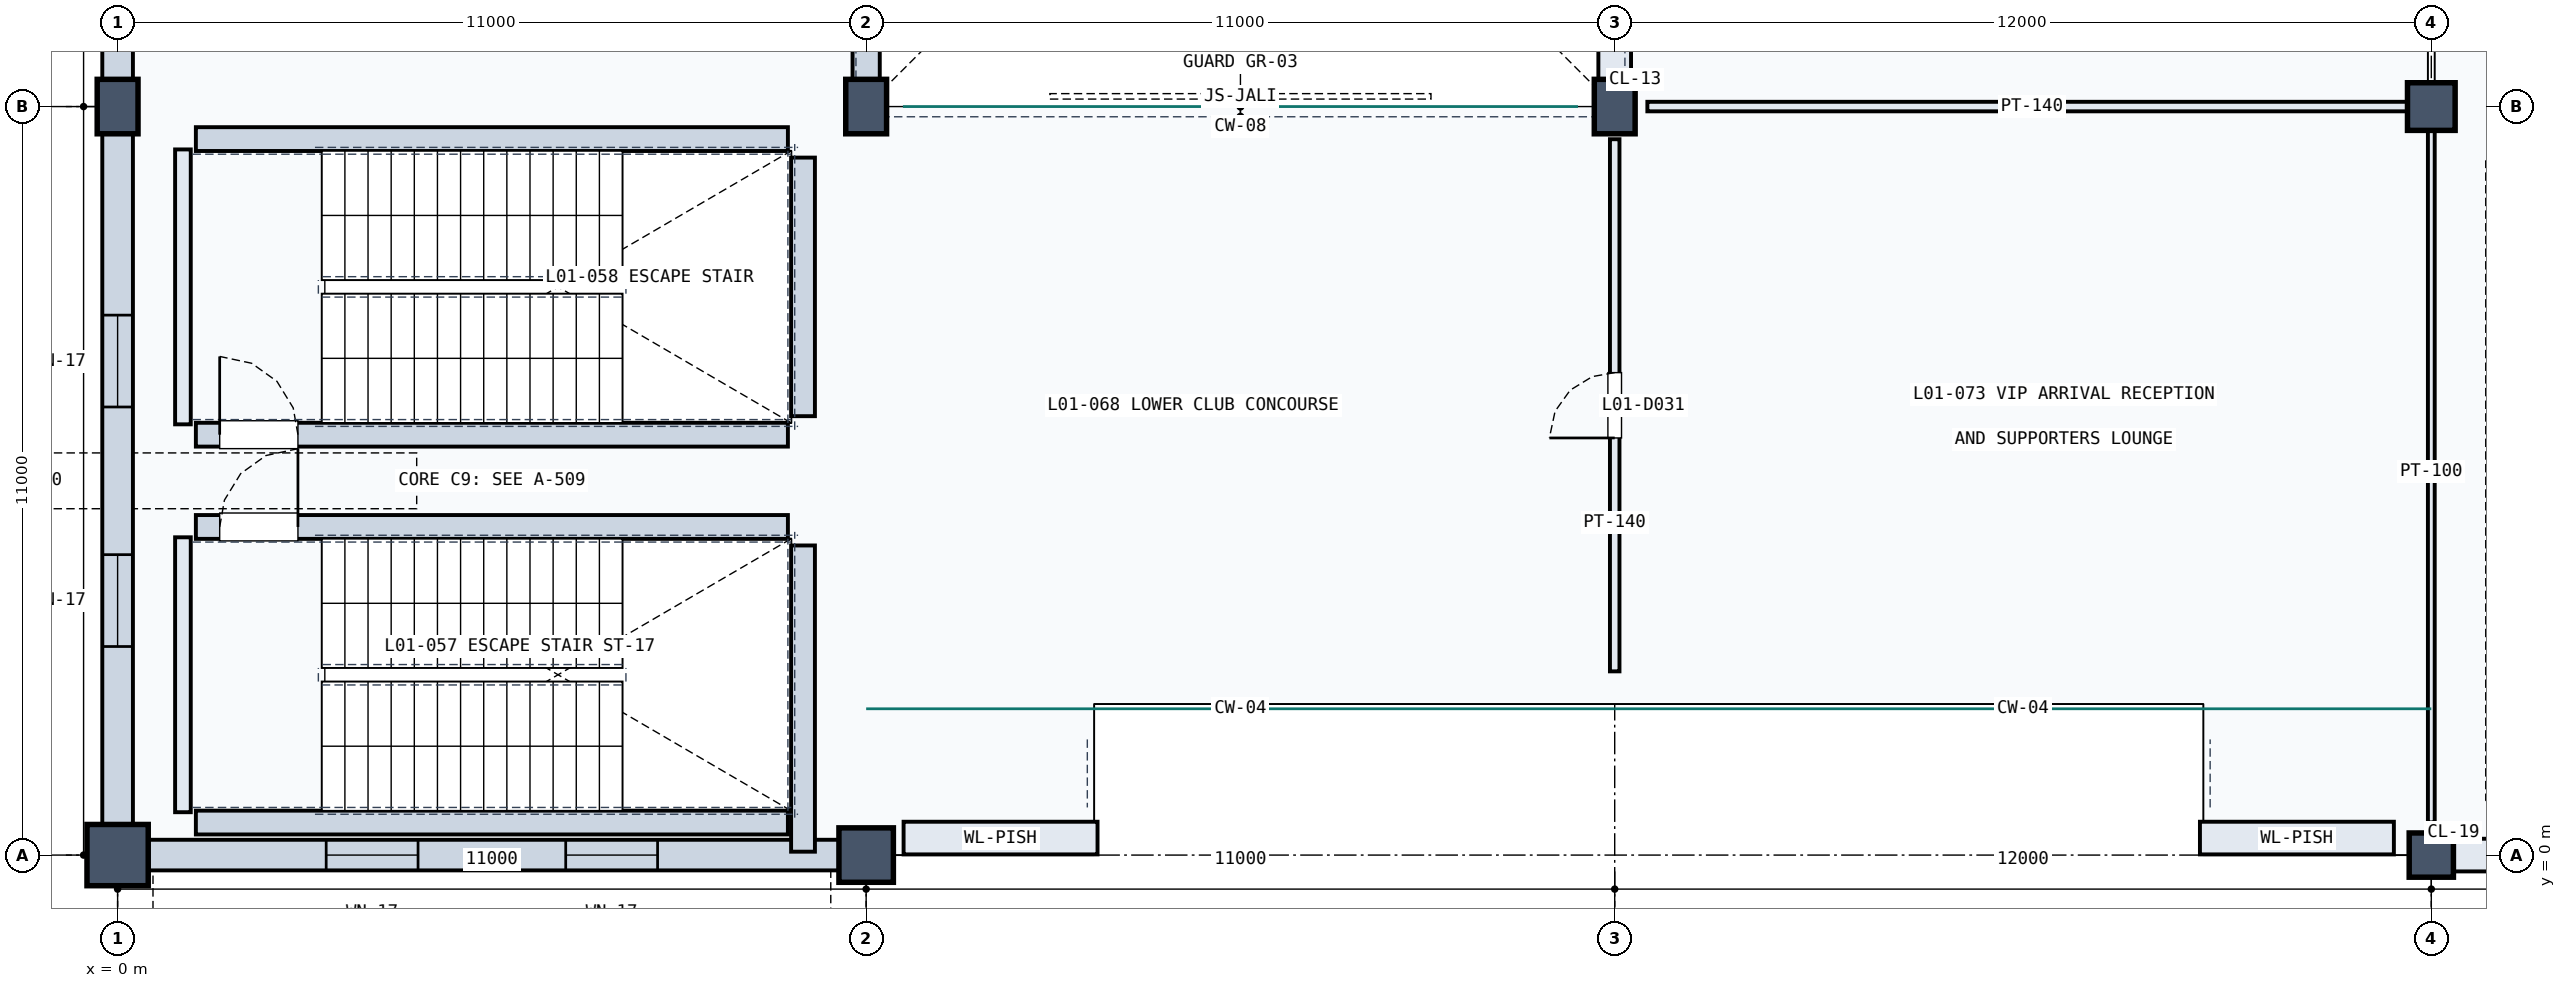
"""IFC4 building model, lengths in metres.
Left out: names, types, materials, properties, quantities, classifications, styles, units other than length and angle.
Written with IfcOpenShell. Run it as: python <this file> out.ifc"""

import sys

from ifc_helpers import new_model, si_unit, direction, frame, frame_2d, origin, origin_with_axes, origin_2d, place, context, subcontext, project, spatial, rectangle, circle, extrude, element, fill, save


model = new_model("IFC4")
c1 = context("Model", 3, precision=1e-05, world=origin(), true_north=direction((0.0, 1.0)))
c2 = subcontext(c1, "Body", "Model", "MODEL_VIEW")
j1 = project(units=[si_unit("LENGTHUNIT", "METRE"), si_unit("PLANEANGLEUNIT", "RADIAN")], contexts=[c1])
p1 = place(None, origin())
s1 = spatial("IfcSite", under=j1, at=p1, CompositionType="ELEMENT")
p2 = place(p1, origin())
s2 = spatial("IfcBuilding", under=s1, at=p2, CompositionType="ELEMENT")
p3 = place(p2, frame((0.0, 0.0, 5.4)))
s3 = spatial("IfcBuildingStorey", under=s2, at=p3, CompositionType="ELEMENT", Elevation=5.4)
p4 = place(p3, origin_with_axes())
e1 = element("IfcColumn", 1, at=p4, inside=s3, PredefinedType="COLUMN", context=c2, shape_type="SweptSolid", body=[
    extrude(circle(Radius=0.45, at=origin_2d()), origin(), (0.0, 0.0, 1.0), 4.8),
])
p5 = place(p3, frame((0.0, 11.0, 0.0), z_axis=(0.0, 0.0, 1.0), x_axis=(1.0, 0.0, 0.0)))
e2 = element("IfcColumn", 2, at=p5, inside=s3, PredefinedType="COLUMN", context=c2, shape_type="SweptSolid", body=[
    extrude(rectangle(XDim=0.6, YDim=0.8, at=origin_2d()), origin(), (0.0, 0.0, 1.0), 4.8),
])
p6 = place(p3, frame((11.0, 0.0, 0.0), z_axis=(0.0, 0.0, 1.0), x_axis=(1.0, 0.0, 0.0)))
e3 = element("IfcColumn", 3, at=p6, inside=s3, PredefinedType="COLUMN", context=c2, shape_type="SweptSolid", body=[
    extrude(circle(Radius=0.4, at=origin_2d()), origin(), (0.0, 0.0, 1.0), 4.8),
])
for number, where, z_axis, x_axis in (
    (4, (11.0, 11.0, 0.0), (0.0, 0.0, 1.0), (1.0, 0.0, 0.0)),
    (5, (22.0, 11.0, 0.0), (0.0, 0.0, 1.0), (1.0, 0.0, 0.0)),
):
    element("IfcColumn", number, at=place(p3, frame(where, z_axis=z_axis, x_axis=x_axis)), inside=s3, PredefinedType="COLUMN", context=c2, shape_type="SweptSolid", body=[
        extrude(rectangle(XDim=0.6, YDim=0.8, at=origin_2d()), origin(), (0.0, 0.0, 1.0), 4.8),
    ])
p7 = place(p3, frame((34.0, 0.0, 0.0), z_axis=(0.0, 0.0, 1.0), x_axis=(1.0, 0.0, 0.0)))
e6 = element("IfcColumn", 6, at=p7, inside=s3, PredefinedType="COLUMN", context=c2, shape_type="SweptSolid", body=[
    extrude(circle(Radius=0.325, at=origin_2d()), origin(), (0.0, 0.0, 1.0), 4.8),
])
p8 = place(p3, frame((34.0, 11.0, 0.0), z_axis=(0.0, 0.0, 1.0), x_axis=(1.0, 0.0, 0.0)))
e7 = element("IfcColumn", 7, at=p8, inside=s3, PredefinedType="COLUMN", context=c2, shape_type="SweptSolid", body=[
    extrude(rectangle(XDim=0.7, YDim=0.7, at=origin_2d()), origin(), (0.0, 0.0, 1.0), 4.8),
])
for number, where, z_axis, x_axis in (
    (8, (11.55, 0.25, 0.0), (0.0, 0.0, 1.0), (1.0, 0.0, 0.0)),
    (9, (30.6, 0.25, 0.0), (0.0, 0.0, 1.0), (1.0, 0.0, 0.0)),
):
    element("IfcWall", number, at=place(p3, frame(where, z_axis=z_axis, x_axis=x_axis)), inside=s3, PredefinedType="SOLIDWALL", context=c2, shape_type="SweptSolid", body=[
        extrude(rectangle(XDim=2.85, YDim=0.48, at=frame_2d((1.425, 0.0))), origin(), (0.0, 0.0, 1.0), 4.44),
    ])
p9 = place(p3, frame((0.22, 0.0, 0.0), z_axis=(0.0, 0.0, 1.0), x_axis=(1.0, 0.0, 0.0)))
e10 = element("IfcWall", 10, at=p9, inside=s3, PredefinedType="SOLIDWALL", context=c2, shape_type="SweptSolid", body=[
    extrude(rectangle(XDim=10.56, YDim=0.45, at=frame_2d((5.28, 0.0))), origin(), (0.0, 0.0, 1.0), 3.79),
])
p10 = place(p9, frame((2.845, 0.0, 0.8)))
e11 = element("IfcOpeningElement", 11, at=p10, cuts=e10, PredefinedType="OPENING", context=c2, shape_type="SweptSolid", body=[
    extrude(rectangle(XDim=1.35, YDim=2.1, at=frame_2d((0.675, 1.05))), frame((0.0, 0.235, 0.0), z_axis=(0.0, -1.0, 0.0), x_axis=(1.0, 0.0, 0.0)), (0.0, 0.0, 1.0), 0.47),
])
p11 = place(p9, frame((6.365, 0.0, 0.8)))
e12 = element("IfcOpeningElement", 12, at=p11, cuts=e10, PredefinedType="OPENING", context=c2, shape_type="SweptSolid", body=[
    extrude(rectangle(XDim=1.35, YDim=2.1, at=frame_2d((0.675, 1.05))), frame((0.0, 0.235, 0.0), z_axis=(0.0, -1.0, 0.0), x_axis=(1.0, 0.0, 0.0)), (0.0, 0.0, 1.0), 0.47),
])
p12 = place(p3, frame((0.0, 0.22, 0.0), z_axis=(0.0, 0.0, 1.0), x_axis=(0.0, 1.0, 0.0)))
e13 = element("IfcWall", 13, at=p12, inside=s3, PredefinedType="SOLIDWALL", context=c2, shape_type="SweptSolid", body=[
    extrude(rectangle(XDim=10.56, YDim=0.45, at=frame_2d((5.28, 0.0))), origin(), (0.0, 0.0, 1.0), 3.69),
])
p13 = place(p12, frame((2.845, 0.0, 0.8)))
e14 = element("IfcOpeningElement", 14, at=p13, cuts=e13, PredefinedType="OPENING", context=c2, shape_type="SweptSolid", body=[
    extrude(rectangle(XDim=1.35, YDim=2.1, at=frame_2d((0.675, 1.05))), frame((0.0, 0.235, 0.0), z_axis=(0.0, -1.0, 0.0), x_axis=(1.0, 0.0, 0.0)), (0.0, 0.0, 1.0), 0.47),
])
p14 = place(p12, frame((6.365, 0.0, 0.8)))
e15 = element("IfcOpeningElement", 15, at=p14, cuts=e13, PredefinedType="OPENING", context=c2, shape_type="SweptSolid", body=[
    extrude(rectangle(XDim=1.35, YDim=2.1, at=frame_2d((0.675, 1.05))), frame((0.0, 0.235, 0.0), z_axis=(0.0, -1.0, 0.0), x_axis=(1.0, 0.0, 0.0)), (0.0, 0.0, 1.0), 0.47),
])
p15 = place(p3, frame((0.0, 11.22, 0.0), z_axis=(0.0, 0.0, 1.0), x_axis=(0.0, 1.0, 0.0)))
e16 = element("IfcWall", 16, at=p15, inside=s3, PredefinedType="SOLIDWALL", context=c2, shape_type="SweptSolid", body=[
    extrude(rectangle(XDim=10.56, YDim=0.45, at=frame_2d((5.28, 0.0))), origin(), (0.0, 0.0, 1.0), 3.69),
])
p16 = place(p15, frame((2.845, 0.0, 0.8)))
e17 = element("IfcOpeningElement", 17, at=p16, cuts=e16, PredefinedType="OPENING", context=c2, shape_type="SweptSolid", body=[
    extrude(rectangle(XDim=1.35, YDim=2.1, at=frame_2d((0.675, 1.05))), frame((0.0, 0.235, 0.0), z_axis=(0.0, -1.0, 0.0), x_axis=(1.0, 0.0, 0.0)), (0.0, 0.0, 1.0), 0.47),
])
p17 = place(p15, frame((6.365, 0.0, 0.8)))
e18 = element("IfcOpeningElement", 18, at=p17, cuts=e16, PredefinedType="OPENING", context=c2, shape_type="SweptSolid", body=[
    extrude(rectangle(XDim=1.35, YDim=2.1, at=frame_2d((0.675, 1.05))), frame((0.0, 0.235, 0.0), z_axis=(0.0, -1.0, 0.0), x_axis=(1.0, 0.0, 0.0)), (0.0, 0.0, 1.0), 0.47),
])
p18 = place(p3, frame((11.0, 11.22, 0.0), z_axis=(0.0, 0.0, 1.0), x_axis=(0.0, 1.0, 0.0)))
e19 = element("IfcWall", 19, at=p18, inside=s3, PredefinedType="SOLIDWALL", context=c2, shape_type="SweptSolid", body=[
    extrude(rectangle(XDim=10.78, YDim=0.4, at=frame_2d((5.39, 0.0))), origin(), (0.0, 0.0, 1.0), 3.69),
])
p19 = place(p18, frame((2.918, 0.0, 0.8)))
e20 = element("IfcOpeningElement", 20, at=p19, cuts=e19, PredefinedType="OPENING", context=c2, shape_type="SweptSolid", body=[
    extrude(rectangle(XDim=1.35, YDim=2.1, at=frame_2d((0.675, 1.05))), frame((0.0, 0.21, 0.0), z_axis=(0.0, -1.0, 0.0), x_axis=(1.0, 0.0, 0.0)), (0.0, 0.0, 1.0), 0.42),
])
p20 = place(p18, frame((6.512, 0.0, 0.8)))
e21 = element("IfcOpeningElement", 21, at=p20, cuts=e19, PredefinedType="OPENING", context=c2, shape_type="SweptSolid", body=[
    extrude(rectangle(XDim=1.35, YDim=2.1, at=frame_2d((0.675, 1.05))), frame((0.0, 0.21, 0.0), z_axis=(0.0, -1.0, 0.0), x_axis=(1.0, 0.0, 0.0)), (0.0, 0.0, 1.0), 0.42),
])
p21 = place(p3, frame((22.0, 11.22, 0.0), z_axis=(0.0, 0.0, 1.0), x_axis=(0.0, 1.0, 0.0)))
e22 = element("IfcWall", 22, at=p21, inside=s3, PredefinedType="SOLIDWALL", context=c2, shape_type="SweptSolid", body=[
    extrude(rectangle(XDim=10.56, YDim=0.48, at=frame_2d((5.28, 0.0))), origin(), (0.0, 0.0, 1.0), 3.707),
])
p22 = place(p21, frame((3.78, 0.0, 0.9)))
e23 = element("IfcOpeningElement", 23, at=p22, cuts=e22, PredefinedType="OPENING", context=c2, shape_type="SweptSolid", body=[
    extrude(rectangle(XDim=3.0, YDim=1.8, at=frame_2d((1.5, 0.9))), frame((0.0, 0.25, 0.0), z_axis=(0.0, -1.0, 0.0), x_axis=(1.0, 0.0, 0.0)), (0.0, 0.0, 1.0), 0.5),
])
p23 = place(p3, frame((34.22, 0.0, 0.0), z_axis=(0.0, 0.0, 1.0), x_axis=(1.0, 0.0, 0.0)))
e24 = element("IfcWall", 24, at=p23, inside=s3, PredefinedType="SOLIDWALL", context=c2, shape_type="SweptSolid", body=[
    extrude(rectangle(XDim=11.56, YDim=0.48, at=frame_2d((5.78, 0.0))), origin(), (0.0, 0.0, 1.0), 3.59),
])
p24 = place(p23, frame((2.853, 0.0, 0.9)))
e25 = element("IfcOpeningElement", 25, at=p24, cuts=e24, PredefinedType="OPENING", context=c2, shape_type="SweptSolid", body=[
    extrude(rectangle(XDim=2.0, YDim=1.65, at=frame_2d((1.0, 0.825))), frame((0.0, 0.25, 0.0), z_axis=(0.0, -1.0, 0.0), x_axis=(1.0, 0.0, 0.0)), (0.0, 0.0, 1.0), 0.5),
])
p25 = place(p23, frame((6.707, 0.0, 0.9)))
e26 = element("IfcOpeningElement", 26, at=p25, cuts=e24, PredefinedType="OPENING", context=c2, shape_type="SweptSolid", body=[
    extrude(rectangle(XDim=2.0, YDim=1.65, at=frame_2d((1.0, 0.825))), frame((0.0, 0.25, 0.0), z_axis=(0.0, -1.0, 0.0), x_axis=(1.0, 0.0, 0.0)), (0.0, 0.0, 1.0), 0.5),
])
p26 = place(p3, frame((0.96, 0.63, 0.0), z_axis=(0.0, 0.0, 1.0), x_axis=(0.0, 1.0, 0.0)))
e27 = element("IfcWall", 27, at=p26, inside=s3, PredefinedType="SOLIDWALL", context=c2, shape_type="SweptSolid", body=[
    extrude(rectangle(XDim=4.04, YDim=0.23, at=frame_2d((2.02, 0.0))), origin(), (0.0, 0.0, 1.0), 4.46),
])
p27 = place(p3, frame((10.072, 0.05, 0.0), z_axis=(0.0, 0.0, 1.0), x_axis=(0.0, 1.0, 0.0)))
e28 = element("IfcWall", 28, at=p27, inside=s3, PredefinedType="SOLIDWALL", context=c2, shape_type="SweptSolid", body=[
    extrude(rectangle(XDim=4.5, YDim=0.35, at=frame_2d((2.25, 0.0))), origin(), (0.0, 0.0, 1.0), 4.46),
])
p28 = place(p3, frame((1.15, 0.478, 0.0), z_axis=(0.0, 0.0, 1.0), x_axis=(1.0, 0.0, 0.0)))
e29 = element("IfcWall", 29, at=p28, inside=s3, PredefinedType="SOLIDWALL", context=c2, shape_type="SweptSolid", body=[
    extrude(rectangle(XDim=8.7, YDim=0.35, at=frame_2d((4.35, 0.0))), origin(), (0.0, 0.0, 1.0), 4.46),
])
p29 = place(p3, frame((1.15, 4.822, 0.0), z_axis=(0.0, 0.0, 1.0), x_axis=(1.0, 0.0, 0.0)))
e30 = element("IfcWall", 30, at=p29, inside=s3, PredefinedType="SOLIDWALL", context=c2, shape_type="SweptSolid", body=[
    extrude(rectangle(XDim=8.7, YDim=0.35, at=frame_2d((4.35, 0.0))), origin(), (0.0, 0.0, 1.0), 4.46),
])
p30 = place(p29, frame((0.35, 0.0, 0.0)))
e31 = element("IfcOpeningElement", 31, at=p30, cuts=e30, PredefinedType="OPENING", context=c2, shape_type="SweptSolid", body=[
    extrude(rectangle(XDim=1.15, YDim=2.2, at=frame_2d((0.575, 1.1))), frame((0.0, 0.185, 0.0), z_axis=(0.0, -1.0, 0.0), x_axis=(1.0, 0.0, 0.0)), (0.0, 0.0, 1.0), 0.37),
])
p31 = place(p3, frame((0.96, 6.33, 0.0), z_axis=(0.0, 0.0, 1.0), x_axis=(0.0, 1.0, 0.0)))
e32 = element("IfcWall", 32, at=p31, inside=s3, PredefinedType="SOLIDWALL", context=c2, shape_type="SweptSolid", body=[
    extrude(rectangle(XDim=4.04, YDim=0.23, at=frame_2d((2.02, 0.0))), origin(), (0.0, 0.0, 1.0), 4.46),
])
p32 = place(p3, frame((10.072, 6.45, 0.0), z_axis=(0.0, 0.0, 1.0), x_axis=(0.0, 1.0, 0.0)))
e33 = element("IfcWall", 33, at=p32, inside=s3, PredefinedType="SOLIDWALL", context=c2, shape_type="SweptSolid", body=[
    extrude(rectangle(XDim=3.8, YDim=0.35, at=frame_2d((1.9, 0.0))), origin(), (0.0, 0.0, 1.0), 4.46),
])
p33 = place(p3, frame((1.15, 6.178, 0.0), z_axis=(0.0, 0.0, 1.0), x_axis=(1.0, 0.0, 0.0)))
e34 = element("IfcWall", 34, at=p33, inside=s3, PredefinedType="SOLIDWALL", context=c2, shape_type="SweptSolid", body=[
    extrude(rectangle(XDim=8.7, YDim=0.35, at=frame_2d((4.35, 0.0))), origin(), (0.0, 0.0, 1.0), 4.46),
])
p34 = place(p33, frame((0.35, 0.0, 0.0)))
e35 = element("IfcOpeningElement", 35, at=p34, cuts=e34, PredefinedType="OPENING", context=c2, shape_type="SweptSolid", body=[
    extrude(rectangle(XDim=1.15, YDim=2.2, at=frame_2d((0.575, 1.1))), frame((0.0, 0.185, 0.0), z_axis=(0.0, -1.0, 0.0), x_axis=(1.0, 0.0, 0.0)), (0.0, 0.0, 1.0), 0.37),
])
p35 = place(p3, frame((1.15, 10.522, 0.0), z_axis=(0.0, 0.0, 1.0), x_axis=(1.0, 0.0, 0.0)))
e36 = element("IfcWall", 36, at=p35, inside=s3, PredefinedType="SOLIDWALL", context=c2, shape_type="SweptSolid", body=[
    extrude(rectangle(XDim=8.7, YDim=0.35, at=frame_2d((4.35, 0.0))), origin(), (0.0, 0.0, 1.0), 4.46),
])
p36 = place(p3, frame((22.0, 2.7, 0.0), z_axis=(0.0, 0.0, 1.0), x_axis=(0.0, 1.0, 0.0)))
e37 = element("IfcWall", 37, at=p36, inside=s3, PredefinedType="PARTITIONING", context=c2, shape_type="SweptSolid", body=[
    extrude(rectangle(XDim=7.82, YDim=0.14, at=frame_2d((3.91, 0.0))), origin(), (0.0, 0.0, 1.0), 3.707),
])
p37 = place(p36, frame((3.43, 0.0, 0.0)))
e38 = element("IfcOpeningElement", 38, at=p37, cuts=e37, PredefinedType="OPENING", context=c2, shape_type="SweptSolid", body=[
    extrude(rectangle(XDim=0.96, YDim=2.15, at=frame_2d((0.48, 1.075))), frame((0.0, 0.08, 0.0), z_axis=(0.0, -1.0, 0.0), x_axis=(1.0, 0.0, 0.0)), (0.0, 0.0, 1.0), 0.16),
])
p38 = place(p3, frame((22.48, 11.0, 0.0), z_axis=(0.0, 0.0, 1.0), x_axis=(1.0, 0.0, 0.0)))
e39 = element("IfcWall", 39, at=p38, inside=s3, PredefinedType="PARTITIONING", context=c2, shape_type="SweptSolid", body=[
    extrude(rectangle(XDim=11.3, YDim=0.14, at=frame_2d((5.65, 0.0))), origin(), (0.0, 0.0, 1.0), 3.49),
])
p39 = place(p3, frame((34.0, 0.48, 0.0), z_axis=(0.0, 0.0, 1.0), x_axis=(0.0, 1.0, 0.0)))
e40 = element("IfcWall", 40, at=p39, inside=s3, PredefinedType="PARTITIONING", context=c2, shape_type="SweptSolid", body=[
    extrude(rectangle(XDim=10.3, YDim=0.1, at=frame_2d((5.15, 0.0))), origin(), (0.0, 0.0, 1.0), 3.49),
])
p40 = place(p10, origin())
e41 = element("IfcWindow", 41, at=p40, inside=s3, PartitioningType="SINGLE_PANEL", PredefinedType="WINDOW", context=c2, shape_type="SweptSolid", body=[
    extrude(rectangle(XDim=1.35, YDim=2.1, at=frame_2d((0.675, 1.05))), frame((0.0, 0.03, 0.0), z_axis=(0.0, -1.0, 0.0), x_axis=(1.0, 0.0, 0.0)), (0.0, 0.0, 1.0), 0.06),
])
fill(e11, e41)
p41 = place(p11, origin())
e42 = element("IfcWindow", 42, at=p41, inside=s3, PartitioningType="SINGLE_PANEL", PredefinedType="WINDOW", context=c2, shape_type="SweptSolid", body=[
    extrude(rectangle(XDim=1.35, YDim=2.1, at=frame_2d((0.675, 1.05))), frame((0.0, 0.03, 0.0), z_axis=(0.0, -1.0, 0.0), x_axis=(1.0, 0.0, 0.0)), (0.0, 0.0, 1.0), 0.06),
])
fill(e12, e42)
p42 = place(p13, origin())
e43 = element("IfcWindow", 43, at=p42, inside=s3, PartitioningType="SINGLE_PANEL", PredefinedType="WINDOW", context=c2, shape_type="SweptSolid", body=[
    extrude(rectangle(XDim=1.35, YDim=2.1, at=frame_2d((0.675, 1.05))), frame((0.0, 0.03, 0.0), z_axis=(0.0, -1.0, 0.0), x_axis=(1.0, 0.0, 0.0)), (0.0, 0.0, 1.0), 0.06),
])
fill(e14, e43)
p43 = place(p14, origin())
e44 = element("IfcWindow", 44, at=p43, inside=s3, PartitioningType="SINGLE_PANEL", PredefinedType="WINDOW", context=c2, shape_type="SweptSolid", body=[
    extrude(rectangle(XDim=1.35, YDim=2.1, at=frame_2d((0.675, 1.05))), frame((0.0, 0.03, 0.0), z_axis=(0.0, -1.0, 0.0), x_axis=(1.0, 0.0, 0.0)), (0.0, 0.0, 1.0), 0.06),
])
fill(e15, e44)
p44 = place(p30, origin())
e45 = element("IfcDoor", 45, at=p44, inside=s3, OperationType="SINGLE_SWING_RIGHT", PredefinedType="DOOR", context=c2, shape_type="SweptSolid", body=[
    extrude(rectangle(XDim=1.15, YDim=2.2, at=frame_2d((0.575, 1.1))), frame((0.0, 0.025, 0.0), z_axis=(0.0, -1.0, 0.0), x_axis=(1.0, 0.0, 0.0)), (0.0, 0.0, 1.0), 0.05),
])
fill(e31, e45)
p45 = place(p34, origin())
e46 = element("IfcDoor", 46, at=p45, inside=s3, OperationType="SINGLE_SWING_LEFT", PredefinedType="DOOR", context=c2, shape_type="SweptSolid", body=[
    extrude(rectangle(XDim=1.15, YDim=2.2, at=frame_2d((0.575, 1.1))), frame((0.0, 0.025, 0.0), z_axis=(0.0, -1.0, 0.0), x_axis=(1.0, 0.0, 0.0)), (0.0, 0.0, 1.0), 0.05),
])
fill(e35, e46)
p46 = place(p37, origin())
e47 = element("IfcDoor", 47, at=p46, inside=s3, OperationType="SINGLE_SWING_LEFT", PredefinedType="DOOR", context=c2, shape_type="SweptSolid", body=[
    extrude(rectangle(XDim=0.96, YDim=2.15, at=frame_2d((0.48, 1.075))), frame((0.0, 0.025, 0.0), z_axis=(0.0, -1.0, 0.0), x_axis=(1.0, 0.0, 0.0)), (0.0, 0.0, 1.0), 0.05),
])
fill(e38, e47)
save(model, sys.argv[1])
